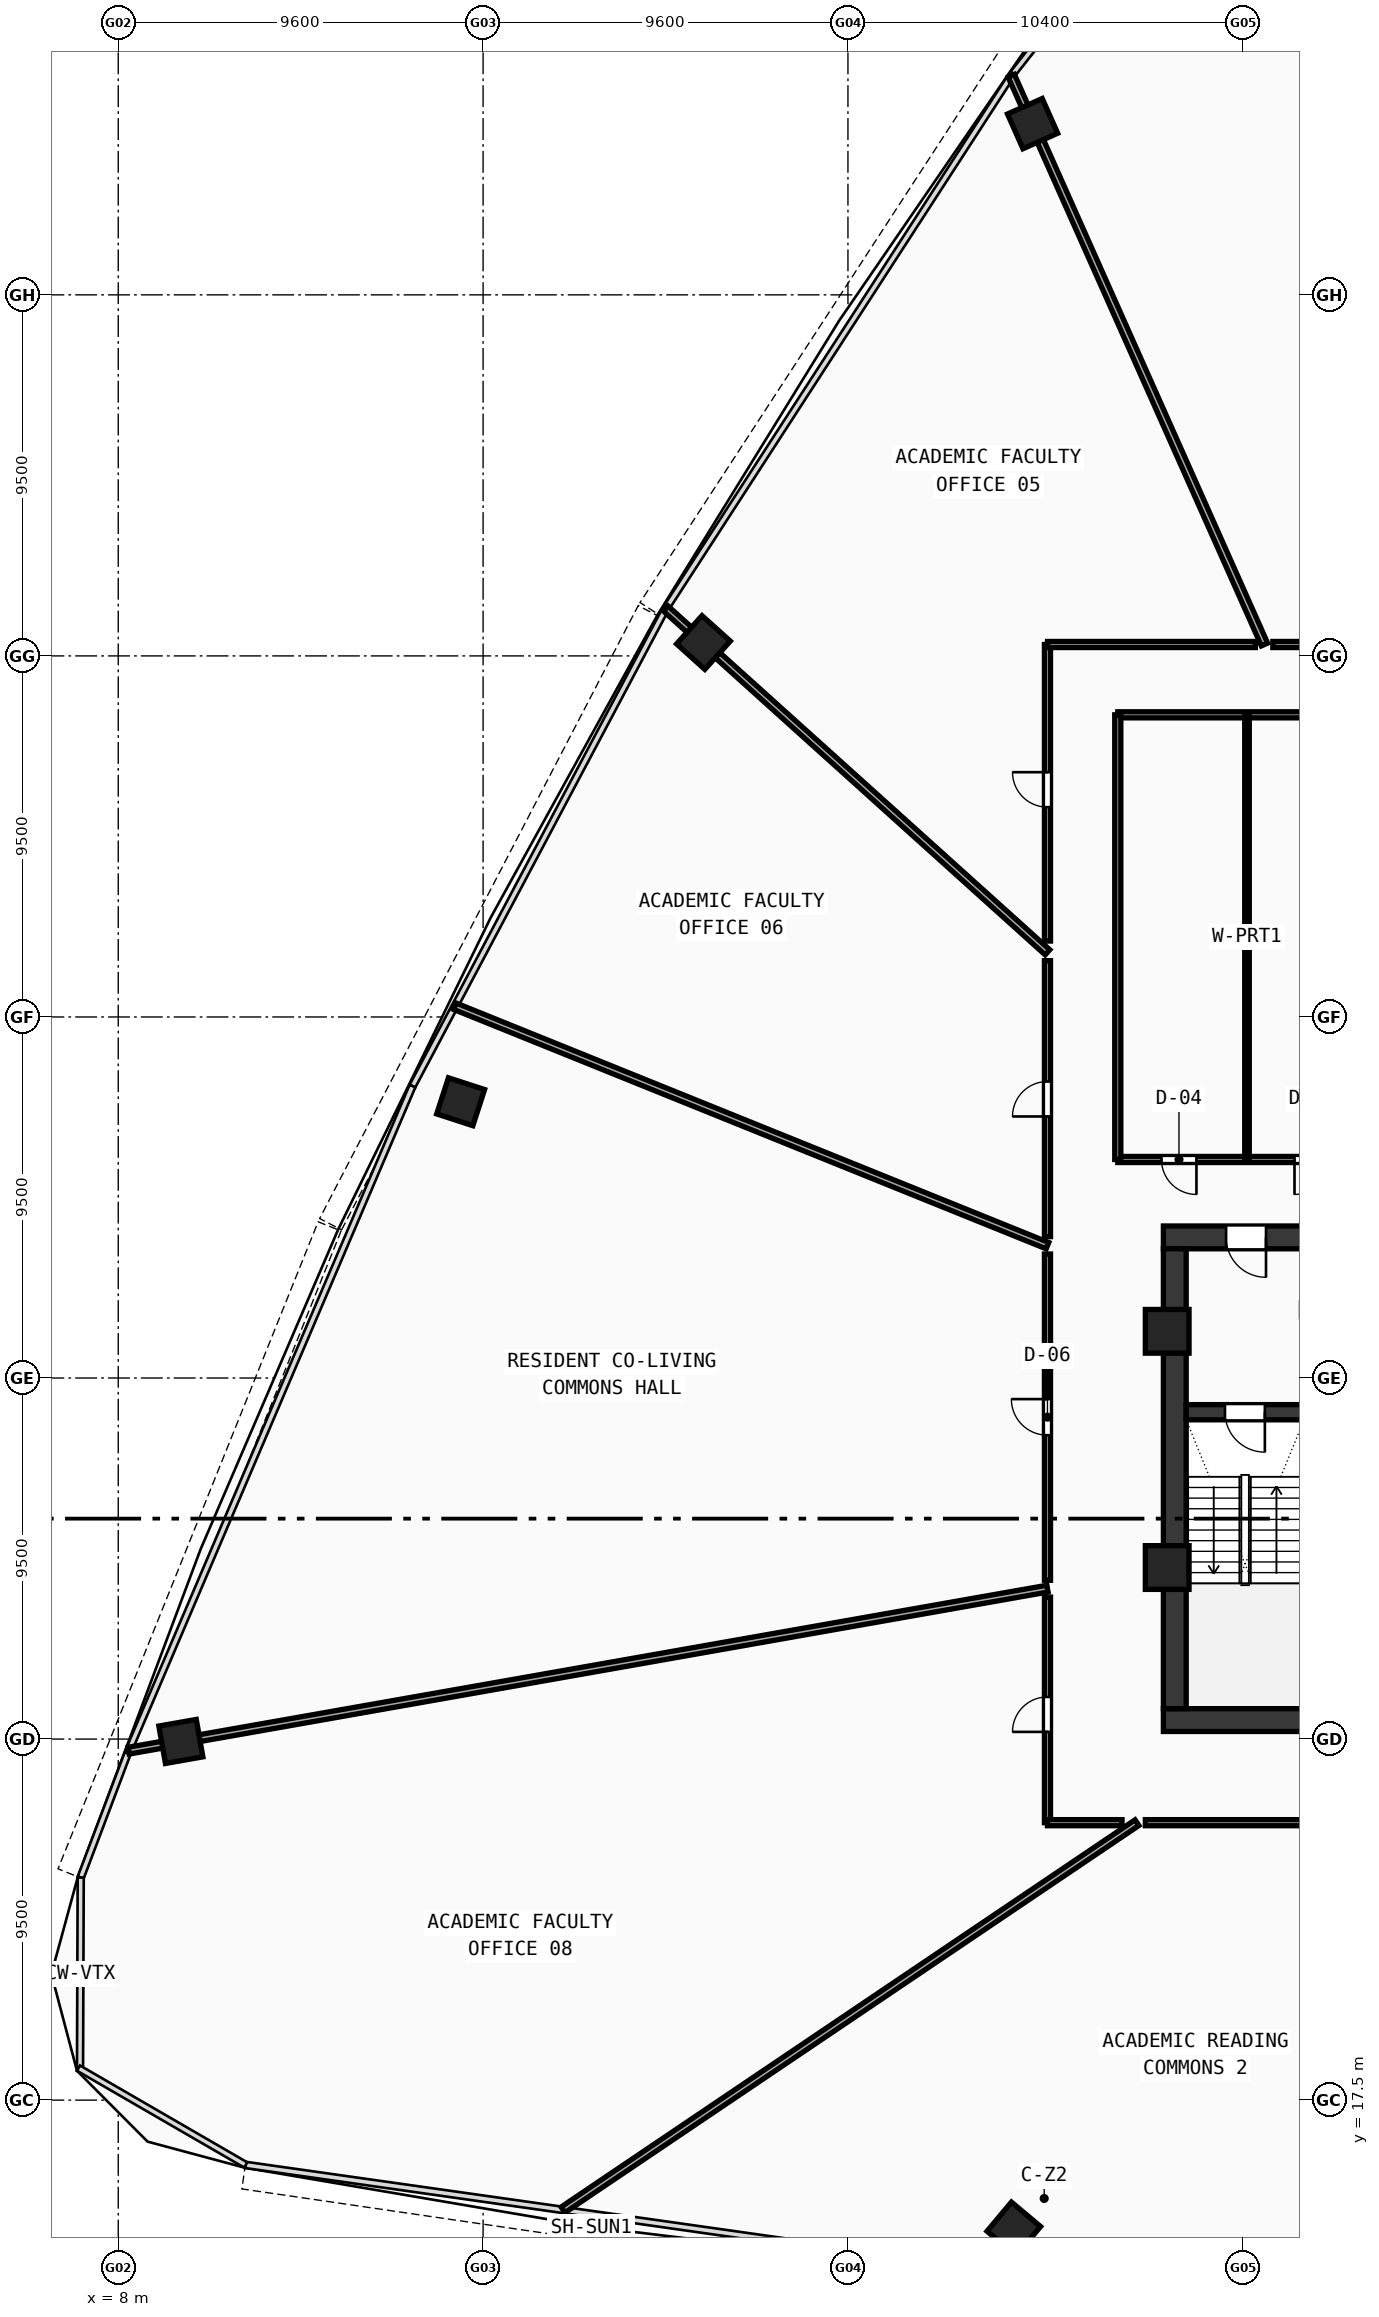
"""IFC4 building model, lengths in metres.
Left out: names, types, materials, properties, quantities, classifications, styles, units other than length and angle.
Written with IfcOpenShell. Run it as: python <this file> out.ifc"""

import sys

from ifc_helpers import new_model, si_unit, direction, frame, frame_2d, origin, origin_with_axes, origin_2d, place, context, subcontext, project, spatial, rectangle, hollow_rectangle, extrude, source, transform, mapped, element, fill, save


model = new_model("IFC4")
c1 = context("Model", 3, precision=1e-05, world=origin(), true_north=direction((0.0, 1.0)))
c2 = subcontext(c1, "Body", "Model", "MODEL_VIEW")
j1 = project(units=[si_unit("LENGTHUNIT", "METRE"), si_unit("PLANEANGLEUNIT", "RADIAN")], contexts=[c1])
p1 = place(None, origin())
s1 = spatial("IfcSite", under=j1, at=p1, CompositionType="ELEMENT")
p2 = place(p1, origin())
s2 = spatial("IfcBuilding", under=s1, at=p2, CompositionType="ELEMENT")
p3 = place(p2, frame((0.0, 0.0, 111.58)))
s3 = spatial("IfcBuildingStorey", under=s2, at=p3, CompositionType="ELEMENT", Elevation=111.58)
p4 = place(p3, frame((35.5, 27.5, 0.0), z_axis=(0.0, 0.0, 1.0), x_axis=(1.0, 0.0, 0.0)))
e1 = element("IfcWall", 1, at=p4, inside=s3, PredefinedType="SHEAR", context=c2, shape_type="SweptSolid", body=[
    extrude(rectangle(XDim=25.0, YDim=0.6, at=frame_2d((12.5, 0.0))), origin(), (0.0, 0.0, 1.0), 3.54),
])
p5 = place(p3, frame((35.5, 40.2, 0.0), z_axis=(0.0, 0.0, 1.0), x_axis=(1.0, 0.0, 0.0)))
e2 = element("IfcWall", 2, at=p5, inside=s3, PredefinedType="SHEAR", context=c2, shape_type="SweptSolid", body=[
    extrude(rectangle(XDim=11.3, YDim=0.6, at=frame_2d((5.65, 0.0))), origin(), (0.0, 0.0, 1.0), 3.54),
])
p6 = place(p5, frame((1.65, 0.0, 0.0)))
e3 = element("IfcOpeningElement", 3, at=p6, cuts=e2, PredefinedType="OPENING", context=c2, shape_type="SweptSolid", body=[
    extrude(rectangle(XDim=1.05, YDim=2.1, at=frame_2d((0.525, 1.05))), frame((0.0, 0.31, 0.0), z_axis=(0.0, -1.0, 0.0), x_axis=(1.0, 0.0, 0.0)), (0.0, 0.0, 1.0), 0.62),
])
p7 = place(p3, frame((35.8, 27.8, 0.0), z_axis=(0.0, 0.0, 1.0), x_axis=(0.0, 1.0, 0.0)))
e4 = element("IfcWall", 4, at=p7, inside=s3, PredefinedType="SHEAR", context=c2, shape_type="SweptSolid", body=[
    extrude(rectangle(XDim=12.1, YDim=0.6, at=frame_2d((6.05, 0.0))), origin(), (0.0, 0.0, 1.0), 3.54),
])
p8 = place(p3, frame((36.1, 35.6, 0.0), z_axis=(0.0, 0.0, 1.0), x_axis=(1.0, 0.0, 0.0)))
e5 = element("IfcWall", 5, at=p8, inside=s3, PredefinedType="SHEAR", context=c2, shape_type="SweptSolid", body=[
    extrude(rectangle(XDim=3.1, YDim=0.4, at=frame_2d((1.55, 0.0))), origin(), (0.0, 0.0, 1.0), 3.54),
])
p9 = place(p8, frame((1.02, 0.0, 0.0)))
e6 = element("IfcOpeningElement", 6, at=p9, cuts=e5, PredefinedType="OPENING", context=c2, shape_type="SweptSolid", body=[
    extrude(rectangle(XDim=1.05, YDim=2.1, at=frame_2d((0.525, 1.05))), frame((0.0, 0.21, 0.0), z_axis=(0.0, -1.0, 0.0), x_axis=(1.0, 0.0, 0.0)), (0.0, 0.0, 1.0), 0.42),
])
m1 = source(origin(), c2, "Body", "SweptSolid", [
    extrude(hollow_rectangle(XDim=1.15, YDim=1.15, WallThickness=0.048, at=origin_2d()), origin(), (0.0, 0.0, 1.0), 3.8),
])
for number, where, z_axis, x_axis in (
    (7, (35.6, 37.729, -0.26), (0.0, 0.0, 1.0), (1.0, 0.0, 0.0)),
    (8, (35.6, 31.513, -0.26), (0.0, 0.0, 1.0), (1.0, 0.0, 0.0)),
):
    element("IfcColumn", number, at=place(p3, frame(where, z_axis=z_axis, x_axis=x_axis)), inside=s3, PredefinedType="COLUMN", context=c2, shape_type="MappedRepresentation", body=[
        mapped(m1, transform((0.0, 0.0, 0.0), scale=1.0)),
    ])
m2 = source(origin(), c2, "Body", "SweptSolid", [
    extrude(hollow_rectangle(XDim=1.0, YDim=1.0, WallThickness=0.042, at=origin_2d()), origin(), (0.0, 0.0, 1.0), 3.8),
])
for number, where, z_axis, x_axis in (
    (9, (31.564, 14.112, -0.26), (0.0, 0.0, 1.0), (0.766, -0.643, 0.0)),
    (10, (32.059, 69.505, -0.26), (0.0, 0.0, 1.0), (-0.914, -0.407, 0.0)),
    (11, (23.397, 55.852, -0.26), (0.0, 0.0, 1.0), (-0.669, -0.743, 0.0)),
    (12, (17.009, 43.77, -0.26), (0.0, 0.0, 1.0), (-0.309, -0.951, 0.0)),
    (13, (9.647, 26.938, -0.26), (0.0, 0.0, 1.0), (0.174, -0.985, 0.0)),
):
    element("IfcColumn", number, at=place(p3, frame(where, z_axis=z_axis, x_axis=x_axis)), inside=s3, PredefinedType="COLUMN", context=c2, shape_type="MappedRepresentation", body=[
        mapped(m2, transform((0.0, 0.0, 0.0), scale=1.0)),
    ])
p10 = place(p3, frame((34.3, 42.25, 0.0), z_axis=(0.0, 0.0, 1.0), x_axis=(1.0, 0.0, 0.0)))
e14 = element("IfcWall", 14, at=p10, inside=s3, PredefinedType="PARTITIONING", context=c2, shape_type="SweptSolid", body=[
    extrude(rectangle(XDim=9.58, YDim=0.16, at=frame_2d((4.79, 0.0))), origin(), (0.0, 0.0, 1.0), 2.84),
])
p11 = place(p10, frame((1.15, 0.0, 0.0)))
e15 = element("IfcOpeningElement", 15, at=p11, cuts=e14, PredefinedType="OPENING", context=c2, shape_type="SweptSolid", body=[
    extrude(rectangle(XDim=0.92, YDim=2.1, at=frame_2d((0.46, 1.05))), frame((0.0, 0.09, 0.0), z_axis=(0.0, -1.0, 0.0), x_axis=(1.0, 0.0, 0.0)), (0.0, 0.0, 1.0), 0.18),
])
p12 = place(p10, frame((4.65, 0.0, 0.0)))
e16 = element("IfcOpeningElement", 16, at=p12, cuts=e14, PredefinedType="OPENING", context=c2, shape_type="SweptSolid", body=[
    extrude(rectangle(XDim=0.92, YDim=2.1, at=frame_2d((0.46, 1.05))), frame((0.0, 0.09, 0.0), z_axis=(0.0, -1.0, 0.0), x_axis=(1.0, 0.0, 0.0)), (0.0, 0.0, 1.0), 0.18),
])
p13 = place(p3, frame((34.3, 53.95, 0.0), z_axis=(0.0, 0.0, 1.0), x_axis=(1.0, 0.0, 0.0)))
e17 = element("IfcWall", 17, at=p13, inside=s3, PredefinedType="PARTITIONING", context=c2, shape_type="SweptSolid", body=[
    extrude(rectangle(XDim=9.58, YDim=0.16, at=frame_2d((4.79, 0.0))), origin(), (0.0, 0.0, 1.0), 2.84),
])
p14 = place(p3, frame((34.3, 42.25, 0.0), z_axis=(0.0, 0.0, 1.0), x_axis=(0.0, 1.0, 0.0)))
e18 = element("IfcWall", 18, at=p14, inside=s3, PredefinedType="PARTITIONING", context=c2, shape_type="SweptSolid", body=[
    extrude(rectangle(XDim=11.7, YDim=0.16, at=frame_2d((5.85, 0.0))), origin(), (0.0, 0.0, 1.0), 2.84),
])
p15 = place(p3, frame((37.7, 42.25, 0.0), z_axis=(0.0, 0.0, 1.0), x_axis=(0.0, 1.0, 0.0)))
e19 = element("IfcWall", 19, at=p15, inside=s3, PredefinedType="PARTITIONING", context=c2, shape_type="SweptSolid", body=[
    extrude(rectangle(XDim=11.7, YDim=0.12, at=frame_2d((5.85, 0.0))), origin(), (0.0, 0.0, 1.0), 2.84),
])
p16 = place(p3, frame((38.16, 55.8, 0.0), z_axis=(0.0, 0.0, 1.0), x_axis=(-0.406727469891, 0.913549541753, 0.0)))
e20 = element("IfcWall", 20, at=p16, inside=s3, PredefinedType="PARTITIONING", context=c2, shape_type="SweptSolid", body=[
    extrude(rectangle(XDim=16.381, YDim=0.18, at=frame_2d((8.19, 0.0))), origin(), (0.0, 0.0, 1.0), 2.84),
])
p17 = place(p3, frame((32.45, 47.701, 0.0), z_axis=(0.0, 0.0, 1.0), x_axis=(-0.743139607037, 0.669136401979, 0.0)))
e21 = element("IfcWall", 21, at=p17, inside=s3, PredefinedType="PARTITIONING", context=c2, shape_type="SweptSolid", body=[
    extrude(rectangle(XDim=13.513, YDim=0.18, at=frame_2d((6.756, 0.0))), origin(), (0.0, 0.0, 1.0), 2.84),
])
p18 = place(p3, frame((32.45, 39.983, 0.0), z_axis=(0.0, 0.0, 1.0), x_axis=(-0.927182599154, 0.374609700656, 0.0)))
e22 = element("IfcWall", 22, at=p18, inside=s3, PredefinedType="PARTITIONING", context=c2, shape_type="SweptSolid", body=[
    extrude(rectangle(XDim=16.818, YDim=0.18, at=frame_2d((8.409, 0.0))), origin(), (0.0, 0.0, 1.0), 2.84),
])
p19 = place(p3, frame((32.45, 30.958, 0.0), z_axis=(0.0, 0.0, 1.0), x_axis=(-0.984808478557, -0.17364406285, 0.0)))
e23 = element("IfcWall", 23, at=p19, inside=s3, PredefinedType="PARTITIONING", context=c2, shape_type="SweptSolid", body=[
    extrude(rectangle(XDim=24.549, YDim=0.18, at=frame_2d((12.274, 0.0))), origin(), (0.0, 0.0, 1.0), 2.84),
])
p20 = place(p3, frame((34.805, 24.8, 0.0), z_axis=(0.0, 0.0, 1.0), x_axis=(-0.829033837177, -0.559198441356, 0.0)))
e24 = element("IfcWall", 24, at=p20, inside=s3, PredefinedType="PARTITIONING", context=c2, shape_type="SweptSolid", body=[
    extrude(rectangle(XDim=18.216, YDim=0.18, at=frame_2d((9.108, 0.0))), origin(), (0.0, 0.0, 1.0), 2.84),
])
p21 = place(p3, frame((32.45, 24.8, 0.0), z_axis=(0.0, 0.0, 1.0), x_axis=(0.0, 1.0, 0.0)))
e25 = element("IfcWall", 25, at=p21, inside=s3, PredefinedType="PARTITIONING", context=c2, shape_type="SweptSolid", body=[
    extrude(rectangle(XDim=5.935, YDim=0.16, at=frame_2d((2.967, 0.0))), origin(), (0.0, 0.0, 1.0), 3.14),
])
p22 = place(p21, frame((2.389, 0.0, 0.0)))
e26 = element("IfcOpeningElement", 26, at=p22, cuts=e25, PredefinedType="OPENING", context=c2, shape_type="SweptSolid", body=[
    extrude(rectangle(XDim=0.92, YDim=2.1, at=frame_2d((0.46, 1.05))), frame((0.0, 0.09, 0.0), z_axis=(0.0, -1.0, 0.0), x_axis=(1.0, 0.0, 0.0)), (0.0, 0.0, 1.0), 0.18),
])
p23 = place(p3, frame((32.45, 31.178, 0.0), z_axis=(0.0, 0.0, 1.0), x_axis=(0.0, 1.0, 0.0)))
e27 = element("IfcWall", 27, at=p23, inside=s3, PredefinedType="PARTITIONING", context=c2, shape_type="SweptSolid", body=[
    extrude(rectangle(XDim=8.585, YDim=0.16, at=frame_2d((4.292, 0.0))), origin(), (0.0, 0.0, 1.0), 2.84),
])
p24 = place(p23, frame((3.817, 0.0, 0.0)))
e28 = element("IfcOpeningElement", 28, at=p24, cuts=e27, PredefinedType="OPENING", context=c2, shape_type="SweptSolid", body=[
    extrude(rectangle(XDim=0.95, YDim=2.1, at=frame_2d((0.475, 1.05))), frame((0.0, 0.09, 0.0), z_axis=(0.0, -1.0, 0.0), x_axis=(1.0, 0.0, 0.0)), (0.0, 0.0, 1.0), 0.18),
])
p25 = place(p3, frame((32.45, 40.22, 0.0), z_axis=(0.0, 0.0, 1.0), x_axis=(0.0, 1.0, 0.0)))
e29 = element("IfcWall", 29, at=p25, inside=s3, PredefinedType="PARTITIONING", context=c2, shape_type="SweptSolid", body=[
    extrude(rectangle(XDim=7.262, YDim=0.16, at=frame_2d((3.631, 0.0))), origin(), (0.0, 0.0, 1.0), 2.84),
])
p26 = place(p25, frame((3.162, 0.0, 0.0)))
e30 = element("IfcOpeningElement", 30, at=p26, cuts=e29, PredefinedType="OPENING", context=c2, shape_type="SweptSolid", body=[
    extrude(rectangle(XDim=0.92, YDim=2.1, at=frame_2d((0.46, 1.05))), frame((0.0, 0.09, 0.0), z_axis=(0.0, -1.0, 0.0), x_axis=(1.0, 0.0, 0.0)), (0.0, 0.0, 1.0), 0.18),
])
p27 = place(p3, frame((32.45, 47.997, 0.0), z_axis=(0.0, 0.0, 1.0), x_axis=(0.0, 1.0, 0.0)))
e31 = element("IfcWall", 31, at=p27, inside=s3, PredefinedType="PARTITIONING", context=c2, shape_type="SweptSolid", body=[
    extrude(rectangle(XDim=7.803, YDim=0.16, at=frame_2d((3.901, 0.0))), origin(), (0.0, 0.0, 1.0), 3.14),
])
p28 = place(p27, frame((3.523, 0.0, 0.0)))
e32 = element("IfcOpeningElement", 32, at=p28, cuts=e31, PredefinedType="OPENING", context=c2, shape_type="SweptSolid", body=[
    extrude(rectangle(XDim=0.92, YDim=2.1, at=frame_2d((0.46, 1.05))), frame((0.0, 0.09, 0.0), z_axis=(0.0, -1.0, 0.0), x_axis=(1.0, 0.0, 0.0)), (0.0, 0.0, 1.0), 0.18),
])
p29 = place(p3, frame((32.45, 55.8, 0.0), z_axis=(0.0, 0.0, 1.0), x_axis=(1.0, 0.0, 0.0)))
e33 = element("IfcWall", 33, at=p29, inside=s3, PredefinedType="PARTITIONING", context=c2, shape_type="SweptSolid", body=[
    extrude(rectangle(XDim=5.47, YDim=0.16, at=frame_2d((2.735, 0.0))), origin(), (0.0, 0.0, 1.0), 3.14),
])
p30 = place(p3, frame((38.38, 55.8, 0.0), z_axis=(0.0, 0.0, 1.0), x_axis=(1.0, 0.0, 0.0)))
e34 = element("IfcWall", 34, at=p30, inside=s3, PredefinedType="PARTITIONING", context=c2, shape_type="SweptSolid", body=[
    extrude(rectangle(XDim=5.329, YDim=0.16, at=frame_2d((2.665, 0.0))), origin(), (0.0, 0.0, 1.0), 2.84),
])
p31 = place(p3, frame((44.527, 24.8, 0.0), z_axis=(0.0, 0.0, 1.0), x_axis=(-1.0, 0.0, 0.0)))
e35 = element("IfcWall", 35, at=p31, inside=s3, PredefinedType="PARTITIONING", context=c2, shape_type="SweptSolid", body=[
    extrude(rectangle(XDim=9.501, YDim=0.16, at=frame_2d((4.751, 0.0))), origin(), (0.0, 0.0, 1.0), 2.84),
])
p32 = place(p31, frame((4.269, 0.0, 0.0)))
e36 = element("IfcOpeningElement", 36, at=p32, cuts=e35, PredefinedType="OPENING", context=c2, shape_type="SweptSolid", body=[
    extrude(rectangle(XDim=0.95, YDim=2.1, at=frame_2d((0.475, 1.05))), frame((0.0, 0.09, 0.0), z_axis=(0.0, -1.0, 0.0), x_axis=(1.0, 0.0, 0.0)), (0.0, 0.0, 1.0), 0.18),
])
p33 = place(p3, frame((34.412, 24.8, 0.0), z_axis=(0.0, 0.0, 1.0), x_axis=(-1.0, 0.0, 0.0)))
e37 = element("IfcWall", 37, at=p33, inside=s3, PredefinedType="PARTITIONING", context=c2, shape_type="SweptSolid", body=[
    extrude(rectangle(XDim=1.962, YDim=0.16, at=frame_2d((0.981, 0.0))), origin(), (0.0, 0.0, 1.0), 3.54),
])
m3 = source(origin(), c2, "Body", "SweptSolid", [
    extrude(rectangle(XDim=1.05, YDim=2.1, at=frame_2d((0.525, 1.05))), frame((0.0, 0.025, 0.0), z_axis=(0.0, -1.0, 0.0), x_axis=(1.0, 0.0, 0.0)), (0.0, 0.0, 1.0), 0.05),
])
p34 = place(p9, frame((1.05, 0.0, 0.0), z_axis=(0.0, 0.0, 1.0), x_axis=(-1.0, 0.0, 0.0)))
e38 = element("IfcDoor", 38, at=p34, inside=s3, OperationType="SINGLE_SWING_LEFT", PredefinedType="DOOR", context=c2, shape_type="MappedRepresentation", body=[
    mapped(m3, transform((0.0, 0.0, 0.0), scale=1.0)),
])
fill(e6, e38)
p35 = place(p6, frame((1.05, 0.0, 0.0), z_axis=(0.0, 0.0, 1.0), x_axis=(-1.0, 0.0, 0.0)))
e39 = element("IfcDoor", 39, at=p35, inside=s3, OperationType="SINGLE_SWING_LEFT", PredefinedType="DOOR", context=c2, shape_type="MappedRepresentation", body=[
    mapped(m3, transform((0.0, 0.0, 0.0), scale=1.0)),
])
fill(e3, e39)
m4 = source(origin(), c2, "Body", "SweptSolid", [
    extrude(rectangle(XDim=0.92, YDim=2.1, at=frame_2d((0.46, 1.05))), frame((0.0, 0.025, 0.0), z_axis=(0.0, -1.0, 0.0), x_axis=(1.0, 0.0, 0.0)), (0.0, 0.0, 1.0), 0.05),
])
p36 = place(p11, frame((0.92, 0.0, 0.0), z_axis=(0.0, 0.0, 1.0), x_axis=(-1.0, 0.0, 0.0)))
e40 = element("IfcDoor", 40, at=p36, inside=s3, OperationType="SINGLE_SWING_LEFT", PredefinedType="DOOR", context=c2, shape_type="MappedRepresentation", body=[
    mapped(m4, transform((0.0, 0.0, 0.0), scale=1.0)),
])
fill(e15, e40)
p37 = place(p12, frame((0.92, 0.0, 0.0), z_axis=(0.0, 0.0, 1.0), x_axis=(-1.0, 0.0, 0.0)))
e41 = element("IfcDoor", 41, at=p37, inside=s3, OperationType="SINGLE_SWING_RIGHT", PredefinedType="DOOR", context=c2, shape_type="MappedRepresentation", body=[
    mapped(m4, transform((0.0, 0.0, 0.0), scale=1.0)),
])
fill(e16, e41)
p38 = place(p28, origin_with_axes())
e42 = element("IfcDoor", 42, at=p38, inside=s3, OperationType="SINGLE_SWING_RIGHT", PredefinedType="DOOR", context=c2, shape_type="MappedRepresentation", body=[
    mapped(m4, transform((0.0, 0.0, 0.0), scale=1.0)),
])
fill(e32, e42)
p39 = place(p26, origin_with_axes())
e43 = element("IfcDoor", 43, at=p39, inside=s3, OperationType="SINGLE_SWING_LEFT", PredefinedType="DOOR", context=c2, shape_type="MappedRepresentation", body=[
    mapped(m4, transform((0.0, 0.0, 0.0), scale=1.0)),
])
fill(e30, e43)
m5 = source(origin(), c2, "Body", "SweptSolid", [
    extrude(rectangle(XDim=0.95, YDim=2.1, at=frame_2d((0.475, 1.05))), frame((0.0, 0.025, 0.0), z_axis=(0.0, -1.0, 0.0), x_axis=(1.0, 0.0, 0.0)), (0.0, 0.0, 1.0), 0.05),
])
p40 = place(p24, origin_with_axes())
e44 = element("IfcDoor", 44, at=p40, inside=s3, OperationType="SINGLE_SWING_RIGHT", PredefinedType="DOOR", context=c2, shape_type="MappedRepresentation", body=[
    mapped(m5, transform((0.0, 0.0, 0.0), scale=1.0)),
])
fill(e28, e44)
p41 = place(p22, origin_with_axes())
e45 = element("IfcDoor", 45, at=p41, inside=s3, OperationType="SINGLE_SWING_LEFT", PredefinedType="DOOR", context=c2, shape_type="MappedRepresentation", body=[
    mapped(m4, transform((0.0, 0.0, 0.0), scale=1.0)),
])
fill(e26, e45)
save(model, sys.argv[1])
